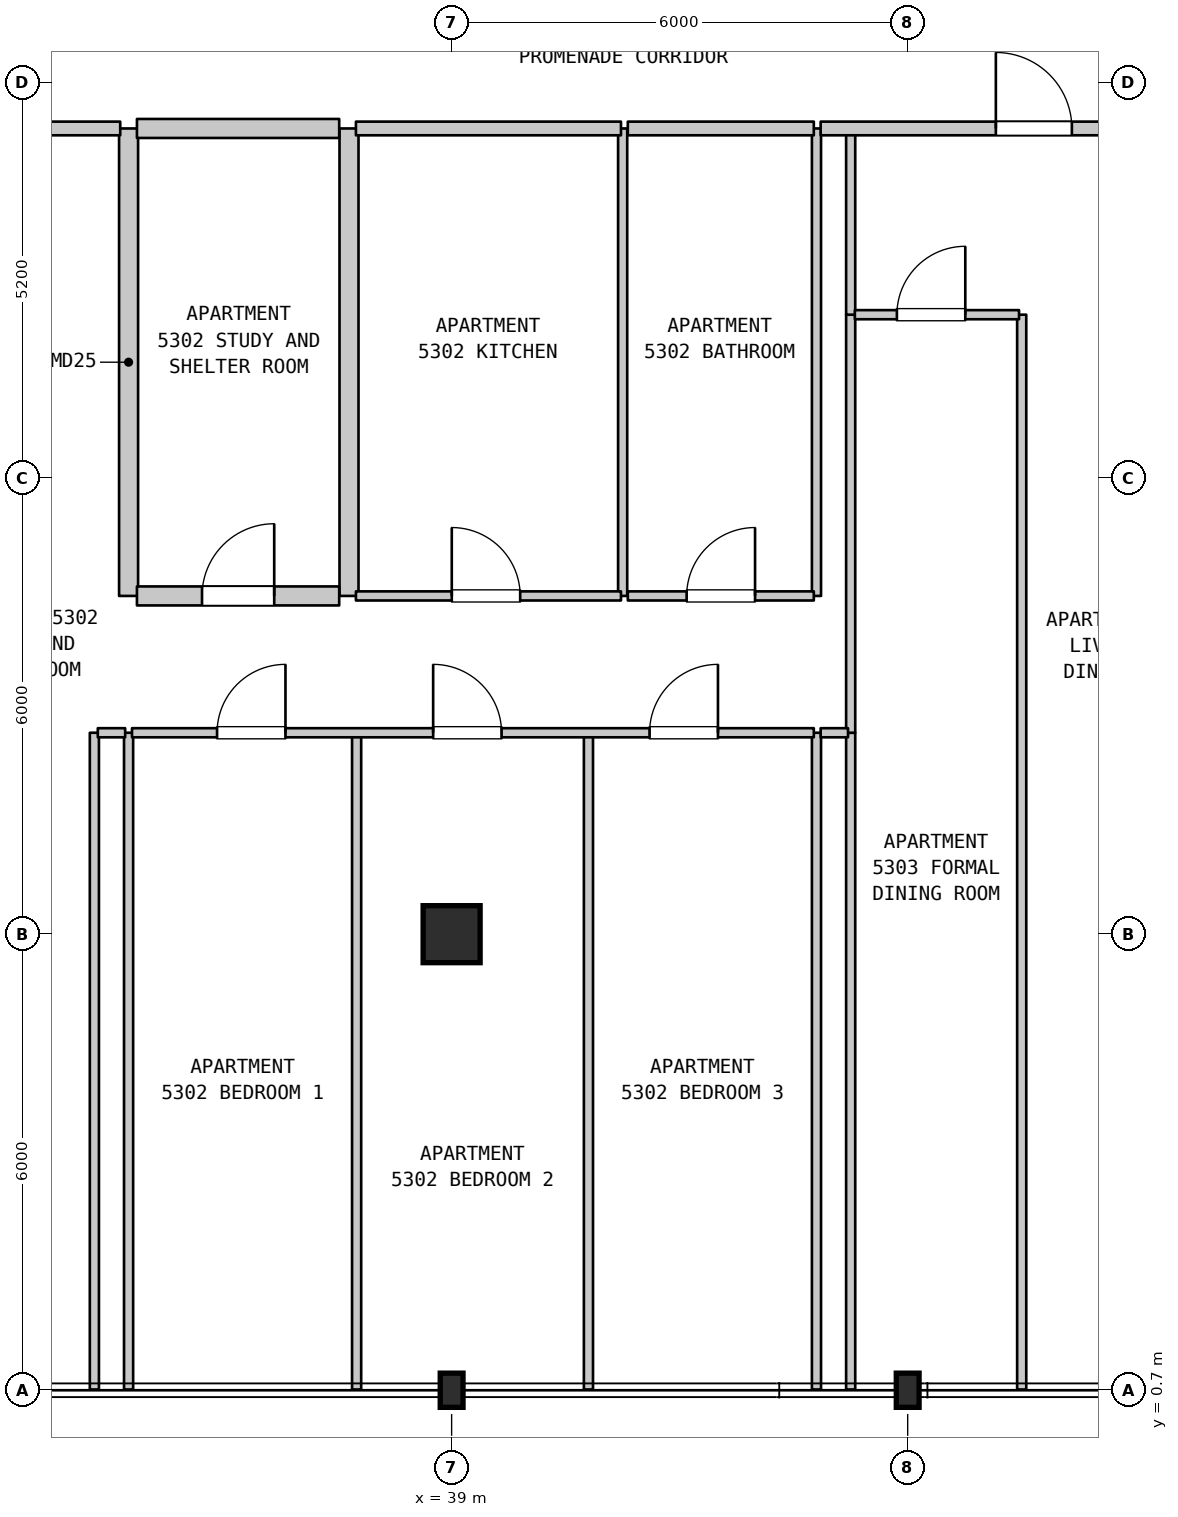
"""IFC4 building model, lengths in metres.
Left out: names, types, materials, properties, quantities, classifications, styles, units other than length and angle.
Written with IfcOpenShell. Run it as: python <this file> out.ifc"""

import sys

from ifc_helpers import new_model, si_unit, direction, frame, frame_2d, origin, origin_2d, place, context, subcontext, project, spatial, rectangle, i_section, extrude, element, fill, save


model = new_model("IFC4")
c1 = context("Model", 3, precision=1e-05, world=origin(), true_north=direction((0.0, 1.0)))
c2 = subcontext(c1, "Body", "Model", "MODEL_VIEW")
j1 = project(units=[si_unit("LENGTHUNIT", "METRE"), si_unit("PLANEANGLEUNIT", "RADIAN")], contexts=[c1])
p1 = place(None, origin())
s1 = spatial("IfcSite", under=j1, at=p1, CompositionType="ELEMENT")
p2 = place(p1, origin())
s2 = spatial("IfcBuilding", under=s1, at=p2, CompositionType="ELEMENT")
p3 = place(p2, frame((0.0, 0.0, 214.3)))
s3 = spatial("IfcBuildingStorey", under=s2, at=p3, CompositionType="ELEMENT", Elevation=214.3)
p4 = place(p3, frame((39.0, 0.7, 0.0), z_axis=(0.0, 0.0, 1.0), x_axis=(1.0, 0.0, 0.0)))
e1 = element("IfcColumn", 1, at=p4, inside=s3, PredefinedType="COLUMN", context=c2, shape_type="SweptSolid", body=[
    extrude(i_section(OverallWidth=0.3, OverallDepth=0.45, WebThickness=0.014, FlangeThickness=0.026, FilletRadius=0.027, at=origin_2d()), origin(), (0.0, 0.0, 1.0), 3.7),
])
p5 = place(p3, frame((39.0, 6.7, 0.0), z_axis=(0.0, 0.0, 1.0), x_axis=(1.0, 0.0, 0.0)))
e2 = element("IfcColumn", 2, at=p5, inside=s3, PredefinedType="COLUMN", context=c2, shape_type="SweptSolid", body=[
    extrude(rectangle(XDim=0.75, YDim=0.75, at=origin_2d()), origin(), (0.0, 0.0, 1.0), 3.7),
])
p6 = place(p3, frame((45.0, 0.7, 0.0), z_axis=(0.0, 0.0, 1.0), x_axis=(1.0, 0.0, 0.0)))
e3 = element("IfcColumn", 3, at=p6, inside=s3, PredefinedType="COLUMN", context=c2, shape_type="SweptSolid", body=[
    extrude(i_section(OverallWidth=0.3, OverallDepth=0.45, WebThickness=0.014, FlangeThickness=0.026, FilletRadius=0.027, at=origin_2d()), origin(), (0.0, 0.0, 1.0), 3.7),
])
for number, where, z_axis, x_axis in (
    (4, (34.3, 0.71, 0.0), (0.0, 0.0, 1.0), (0.0, 1.0, 0.0)),
    (5, (34.75, 0.71, 0.0), (0.0, 0.0, 1.0), (0.0, 1.0, 0.0)),
):
    element("IfcWall", number, at=place(p3, frame(where, z_axis=z_axis, x_axis=x_axis)), inside=s3, PredefinedType="PARTITIONING", context=c2, shape_type="SweptSolid", body=[
        extrude(rectangle(XDim=8.64, YDim=0.12, at=frame_2d((4.32, 0.0))), origin(), (0.0, 0.0, 1.0), 3.38),
    ])
for number, where, z_axis, x_axis in (
    (6, (34.75, 11.15, 0.0), (0.0, 0.0, 1.0), (0.0, 1.0, 0.0)),
    (7, (37.65, 11.15, 0.0), (0.0, 0.0, 1.0), (0.0, 1.0, 0.0)),
):
    element("IfcWall", number, at=place(p3, frame(where, z_axis=z_axis, x_axis=x_axis)), inside=s3, PredefinedType="STANDARD", context=c2, shape_type="SweptSolid", body=[
        extrude(rectangle(XDim=6.15, YDim=0.25, at=frame_2d((3.075, 0.0))), origin(), (0.0, 0.0, 1.0), 3.38),
    ])
for number, where, z_axis, x_axis in (
    (8, (37.75, 0.71, 0.0), (0.0, 0.0, 1.0), (0.0, 1.0, 0.0)),
    (9, (40.8, 0.71, 0.0), (0.0, 0.0, 1.0), (0.0, 1.0, 0.0)),
):
    element("IfcWall", number, at=place(p3, frame(where, z_axis=z_axis, x_axis=x_axis)), inside=s3, PredefinedType="PARTITIONING", context=c2, shape_type="SweptSolid", body=[
        extrude(rectangle(XDim=8.64, YDim=0.12, at=frame_2d((4.32, 0.0))), origin(), (0.0, 0.0, 1.0), 3.38),
    ])
p7 = place(p3, frame((41.25, 11.15, 0.0), z_axis=(0.0, 0.0, 1.0), x_axis=(0.0, 1.0, 0.0)))
e10 = element("IfcWall", 10, at=p7, inside=s3, PredefinedType="PARTITIONING", context=c2, shape_type="SweptSolid", body=[
    extrude(rectangle(XDim=6.15, YDim=0.12, at=frame_2d((3.075, 0.0))), origin(), (0.0, 0.0, 1.0), 3.38),
])
p8 = place(p3, frame((43.8, 0.71, 0.0), z_axis=(0.0, 0.0, 1.0), x_axis=(0.0, 1.0, 0.0)))
e11 = element("IfcWall", 11, at=p8, inside=s3, PredefinedType="PARTITIONING", context=c2, shape_type="SweptSolid", body=[
    extrude(rectangle(XDim=8.64, YDim=0.12, at=frame_2d((4.32, 0.0))), origin(), (0.0, 0.0, 1.0), 3.38),
])
p9 = place(p3, frame((43.8, 11.15, 0.0), z_axis=(0.0, 0.0, 1.0), x_axis=(0.0, 1.0, 0.0)))
e12 = element("IfcWall", 12, at=p9, inside=s3, PredefinedType="PARTITIONING", context=c2, shape_type="SweptSolid", body=[
    extrude(rectangle(XDim=6.15, YDim=0.12, at=frame_2d((3.075, 0.0))), origin(), (0.0, 0.0, 1.0), 3.38),
])
p10 = place(p3, frame((44.25, 0.71, 0.0), z_axis=(0.0, 0.0, 1.0), x_axis=(0.0, 1.0, 0.0)))
e13 = element("IfcWall", 13, at=p10, inside=s3, PredefinedType="PARTITIONING", context=c2, shape_type="SweptSolid", body=[
    extrude(rectangle(XDim=8.64, YDim=0.12, at=frame_2d((4.32, 0.0))), origin(), (0.0, 0.0, 1.0), 3.38),
])
p11 = place(p3, frame((44.25, 9.35, 0.0), z_axis=(0.0, 0.0, 1.0), x_axis=(0.0, 1.0, 0.0)))
e14 = element("IfcWall", 14, at=p11, inside=s3, PredefinedType="PARTITIONING", context=c2, shape_type="SweptSolid", body=[
    extrude(rectangle(XDim=5.5, YDim=0.12, at=frame_2d((2.75, 0.0))), origin(), (0.0, 0.0, 1.0), 3.38),
])
p12 = place(p3, frame((44.25, 14.85, 0.0), z_axis=(0.0, 0.0, 1.0), x_axis=(0.0, 1.0, 0.0)))
e15 = element("IfcWall", 15, at=p12, inside=s3, PredefinedType="PARTITIONING", context=c2, shape_type="SweptSolid", body=[
    extrude(rectangle(XDim=2.45, YDim=0.12, at=frame_2d((1.225, 0.0))), origin(), (0.0, 0.0, 1.0), 3.38),
])
p13 = place(p3, frame((46.5, 0.71, 0.0), z_axis=(0.0, 0.0, 1.0), x_axis=(0.0, 1.0, 0.0)))
e16 = element("IfcWall", 16, at=p13, inside=s3, PredefinedType="PARTITIONING", context=c2, shape_type="SweptSolid", body=[
    extrude(rectangle(XDim=14.14, YDim=0.12, at=frame_2d((7.07, 0.0))), origin(), (0.0, 0.0, 1.0), 3.38),
])
p14 = place(p3, frame((34.345, 9.35, 0.0), z_axis=(0.0, 0.0, 1.0), x_axis=(1.0, 0.0, 0.0)))
e17 = element("IfcWall", 17, at=p14, inside=s3, PredefinedType="PARTITIONING", context=c2, shape_type="SweptSolid", body=[
    extrude(rectangle(XDim=0.36, YDim=0.12, at=frame_2d((0.18, 0.0))), origin(), (0.0, 0.0, 1.0), 3.38),
])
p15 = place(p3, frame((34.795, 9.35, 0.0), z_axis=(0.0, 0.0, 1.0), x_axis=(1.0, 0.0, 0.0)))
e18 = element("IfcWall", 18, at=p15, inside=s3, PredefinedType="PARTITIONING", context=c2, shape_type="SweptSolid", body=[
    extrude(rectangle(XDim=8.97, YDim=0.12, at=frame_2d((4.485, 0.0))), origin(), (0.0, 0.0, 1.0), 3.38),
])
p16 = place(p15, frame((1.119, 0.0, 0.0)))
e19 = element("IfcOpeningElement", 19, at=p16, cuts=e18, PredefinedType="OPENING", context=c2, shape_type="SweptSolid", body=[
    extrude(rectangle(XDim=0.9, YDim=2.15, at=frame_2d((0.45, 1.075))), frame((0.0, 0.07, 0.0), z_axis=(0.0, -1.0, 0.0), x_axis=(1.0, 0.0, 0.0)), (0.0, 0.0, 1.0), 0.14),
])
p17 = place(p15, frame((3.962, 0.0, 0.0)))
e20 = element("IfcOpeningElement", 20, at=p17, cuts=e18, PredefinedType="OPENING", context=c2, shape_type="SweptSolid", body=[
    extrude(rectangle(XDim=0.9, YDim=2.15, at=frame_2d((0.45, 1.075))), frame((0.0, 0.07, 0.0), z_axis=(0.0, -1.0, 0.0), x_axis=(1.0, 0.0, 0.0)), (0.0, 0.0, 1.0), 0.14),
])
p18 = place(p15, frame((6.809, 0.0, 0.0)))
e21 = element("IfcOpeningElement", 21, at=p18, cuts=e18, PredefinedType="OPENING", context=c2, shape_type="SweptSolid", body=[
    extrude(rectangle(XDim=0.9, YDim=2.15, at=frame_2d((0.45, 1.075))), frame((0.0, 0.07, 0.0), z_axis=(0.0, -1.0, 0.0), x_axis=(1.0, 0.0, 0.0)), (0.0, 0.0, 1.0), 0.14),
])
p19 = place(p3, frame((43.855, 9.35, 0.0), z_axis=(0.0, 0.0, 1.0), x_axis=(1.0, 0.0, 0.0)))
e22 = element("IfcWall", 22, at=p19, inside=s3, PredefinedType="PARTITIONING", context=c2, shape_type="SweptSolid", body=[
    extrude(rectangle(XDim=0.36, YDim=0.12, at=frame_2d((0.18, 0.0))), origin(), (0.0, 0.0, 1.0), 3.38),
])
p20 = place(p3, frame((34.86, 11.15, 0.0), z_axis=(0.0, 0.0, 1.0), x_axis=(1.0, 0.0, 0.0)))
e23 = element("IfcWall", 23, at=p20, inside=s3, PredefinedType="STANDARD", context=c2, shape_type="SweptSolid", body=[
    extrude(rectangle(XDim=2.661, YDim=0.25, at=frame_2d((1.331, 0.0))), origin(), (0.0, 0.0, 1.0), 3.38),
])
p21 = place(p20, frame((0.856, 0.0, 0.0)))
e24 = element("IfcOpeningElement", 24, at=p21, cuts=e23, PredefinedType="OPENING", context=c2, shape_type="SweptSolid", body=[
    extrude(rectangle(XDim=0.95, YDim=2.15, at=frame_2d((0.475, 1.075))), frame((0.0, 0.135, 0.0), z_axis=(0.0, -1.0, 0.0), x_axis=(1.0, 0.0, 0.0)), (0.0, 0.0, 1.0), 0.27),
])
p22 = place(p3, frame((37.741, 11.15, 0.0), z_axis=(0.0, 0.0, 1.0), x_axis=(1.0, 0.0, 0.0)))
e25 = element("IfcWall", 25, at=p22, inside=s3, PredefinedType="PARTITIONING", context=c2, shape_type="SweptSolid", body=[
    extrude(rectangle(XDim=3.487, YDim=0.12, at=frame_2d((1.744, 0.0))), origin(), (0.0, 0.0, 1.0), 3.38),
])
p23 = place(p22, frame((1.261, 0.0, 0.0)))
e26 = element("IfcOpeningElement", 26, at=p23, cuts=e25, PredefinedType="OPENING", context=c2, shape_type="SweptSolid", body=[
    extrude(rectangle(XDim=0.9, YDim=2.15, at=frame_2d((0.45, 1.075))), frame((0.0, 0.07, 0.0), z_axis=(0.0, -1.0, 0.0), x_axis=(1.0, 0.0, 0.0)), (0.0, 0.0, 1.0), 0.14),
])
p24 = place(p3, frame((41.318, 11.15, 0.0), z_axis=(0.0, 0.0, 1.0), x_axis=(1.0, 0.0, 0.0)))
e27 = element("IfcWall", 27, at=p24, inside=s3, PredefinedType="PARTITIONING", context=c2, shape_type="SweptSolid", body=[
    extrude(rectangle(XDim=2.447, YDim=0.12, at=frame_2d((1.223, 0.0))), origin(), (0.0, 0.0, 1.0), 3.38),
])
p25 = place(p24, frame((0.774, 0.0, 0.0)))
e28 = element("IfcOpeningElement", 28, at=p25, cuts=e27, PredefinedType="OPENING", context=c2, shape_type="SweptSolid", body=[
    extrude(rectangle(XDim=0.9, YDim=2.1, at=frame_2d((0.45, 1.05))), frame((0.0, 0.07, 0.0), z_axis=(0.0, -1.0, 0.0), x_axis=(1.0, 0.0, 0.0)), (0.0, 0.0, 1.0), 0.14),
])
p26 = place(p3, frame((44.305, 14.85, 0.0), z_axis=(0.0, 0.0, 1.0), x_axis=(1.0, 0.0, 0.0)))
e29 = element("IfcWall", 29, at=p26, inside=s3, PredefinedType="PARTITIONING", context=c2, shape_type="SweptSolid", body=[
    extrude(rectangle(XDim=2.16, YDim=0.12, at=frame_2d((1.08, 0.0))), origin(), (0.0, 0.0, 1.0), 3.38),
])
p27 = place(p26, frame((0.553, 0.0, 0.0)))
e30 = element("IfcOpeningElement", 30, at=p27, cuts=e29, PredefinedType="OPENING", context=c2, shape_type="SweptSolid", body=[
    extrude(rectangle(XDim=0.9, YDim=2.15, at=frame_2d((0.45, 1.075))), frame((0.0, 0.07, 0.0), z_axis=(0.0, -1.0, 0.0), x_axis=(1.0, 0.0, 0.0)), (0.0, 0.0, 1.0), 0.14),
])
p28 = place(p3, frame((29.545, 17.3, 0.0), z_axis=(0.0, 0.0, 1.0), x_axis=(1.0, 0.0, 0.0)))
e31 = element("IfcWall", 31, at=p28, inside=s3, PredefinedType="STANDARD", context=c2, shape_type="SweptSolid", body=[
    extrude(rectangle(XDim=5.095, YDim=0.18, at=frame_2d((2.547, 0.0))), origin(), (0.0, 0.0, 1.0), 3.38),
])
p29 = place(p28, frame((1.792, 0.0, 0.0)))
e32 = element("IfcOpeningElement", 32, at=p29, cuts=e31, PredefinedType="OPENING", context=c2, shape_type="SweptSolid", body=[
    extrude(rectangle(XDim=1.0, YDim=2.15, at=frame_2d((0.5, 1.075))), frame((0.0, 0.1, 0.0), z_axis=(0.0, -1.0, 0.0), x_axis=(1.0, 0.0, 0.0)), (0.0, 0.0, 1.0), 0.2),
])
p30 = place(p3, frame((34.86, 17.3, 0.0), z_axis=(0.0, 0.0, 1.0), x_axis=(1.0, 0.0, 0.0)))
e33 = element("IfcWall", 33, at=p30, inside=s3, PredefinedType="STANDARD", context=c2, shape_type="SweptSolid", body=[
    extrude(rectangle(XDim=2.661, YDim=0.25, at=frame_2d((1.331, 0.0))), origin(), (0.0, 0.0, 1.0), 3.38),
])
p31 = place(p3, frame((37.741, 17.3, 0.0), z_axis=(0.0, 0.0, 1.0), x_axis=(1.0, 0.0, 0.0)))
e34 = element("IfcWall", 34, at=p31, inside=s3, PredefinedType="STANDARD", context=c2, shape_type="SweptSolid", body=[
    extrude(rectangle(XDim=3.487, YDim=0.18, at=frame_2d((1.744, 0.0))), origin(), (0.0, 0.0, 1.0), 3.38),
])
p32 = place(p3, frame((41.318, 17.3, 0.0), z_axis=(0.0, 0.0, 1.0), x_axis=(1.0, 0.0, 0.0)))
e35 = element("IfcWall", 35, at=p32, inside=s3, PredefinedType="STANDARD", context=c2, shape_type="SweptSolid", body=[
    extrude(rectangle(XDim=2.447, YDim=0.18, at=frame_2d((1.223, 0.0))), origin(), (0.0, 0.0, 1.0), 3.38),
])
p33 = place(p3, frame((43.855, 17.3, 0.0), z_axis=(0.0, 0.0, 1.0), x_axis=(1.0, 0.0, 0.0)))
e36 = element("IfcWall", 36, at=p33, inside=s3, PredefinedType="STANDARD", context=c2, shape_type="SweptSolid", body=[
    extrude(rectangle(XDim=5.21, YDim=0.18, at=frame_2d((2.605, 0.0))), origin(), (0.0, 0.0, 1.0), 3.38),
])
p34 = place(p33, frame((2.305, 0.0, 0.0)))
e37 = element("IfcOpeningElement", 37, at=p34, cuts=e36, PredefinedType="OPENING", context=c2, shape_type="SweptSolid", body=[
    extrude(rectangle(XDim=1.0, YDim=2.15, at=frame_2d((0.5, 1.075))), frame((0.0, 0.1, 0.0), z_axis=(0.0, -1.0, 0.0), x_axis=(1.0, 0.0, 0.0)), (0.0, 0.0, 1.0), 0.2),
])
p35 = place(p16, origin())
e38 = element("IfcDoor", 38, at=p35, inside=s3, OperationType="SINGLE_SWING_RIGHT", PredefinedType="DOOR", context=c2, shape_type="SweptSolid", body=[
    extrude(rectangle(XDim=0.9, YDim=2.15, at=frame_2d((0.45, 1.075))), frame((0.0, 0.025, 0.0), z_axis=(0.0, -1.0, 0.0), x_axis=(1.0, 0.0, 0.0)), (0.0, 0.0, 1.0), 0.05),
])
fill(e19, e38)
p36 = place(p17, origin())
e39 = element("IfcDoor", 39, at=p36, inside=s3, OperationType="SINGLE_SWING_LEFT", PredefinedType="DOOR", context=c2, shape_type="SweptSolid", body=[
    extrude(rectangle(XDim=0.9, YDim=2.15, at=frame_2d((0.45, 1.075))), frame((0.0, 0.025, 0.0), z_axis=(0.0, -1.0, 0.0), x_axis=(1.0, 0.0, 0.0)), (0.0, 0.0, 1.0), 0.05),
])
fill(e20, e39)
p37 = place(p18, origin())
e40 = element("IfcDoor", 40, at=p37, inside=s3, OperationType="SINGLE_SWING_RIGHT", PredefinedType="DOOR", context=c2, shape_type="SweptSolid", body=[
    extrude(rectangle(XDim=0.9, YDim=2.15, at=frame_2d((0.45, 1.075))), frame((0.0, 0.025, 0.0), z_axis=(0.0, -1.0, 0.0), x_axis=(1.0, 0.0, 0.0)), (0.0, 0.0, 1.0), 0.05),
])
fill(e21, e40)
p38 = place(p21, origin())
e41 = element("IfcDoor", 41, at=p38, inside=s3, OperationType="SINGLE_SWING_RIGHT", PredefinedType="DOOR", context=c2, shape_type="SweptSolid", body=[
    extrude(rectangle(XDim=0.95, YDim=2.15, at=frame_2d((0.475, 1.075))), frame((0.0, 0.025, 0.0), z_axis=(0.0, -1.0, 0.0), x_axis=(1.0, 0.0, 0.0)), (0.0, 0.0, 1.0), 0.05),
])
fill(e24, e41)
p39 = place(p23, origin())
e42 = element("IfcDoor", 42, at=p39, inside=s3, OperationType="SINGLE_SWING_LEFT", PredefinedType="DOOR", context=c2, shape_type="SweptSolid", body=[
    extrude(rectangle(XDim=0.9, YDim=2.15, at=frame_2d((0.45, 1.075))), frame((0.0, 0.025, 0.0), z_axis=(0.0, -1.0, 0.0), x_axis=(1.0, 0.0, 0.0)), (0.0, 0.0, 1.0), 0.05),
])
fill(e26, e42)
p40 = place(p25, origin())
e43 = element("IfcDoor", 43, at=p40, inside=s3, OperationType="SINGLE_SWING_RIGHT", PredefinedType="DOOR", context=c2, shape_type="SweptSolid", body=[
    extrude(rectangle(XDim=0.9, YDim=2.1, at=frame_2d((0.45, 1.05))), frame((0.0, 0.025, 0.0), z_axis=(0.0, -1.0, 0.0), x_axis=(1.0, 0.0, 0.0)), (0.0, 0.0, 1.0), 0.05),
])
fill(e28, e43)
p41 = place(p27, origin())
e44 = element("IfcDoor", 44, at=p41, inside=s3, OperationType="SINGLE_SWING_RIGHT", PredefinedType="DOOR", context=c2, shape_type="SweptSolid", body=[
    extrude(rectangle(XDim=0.9, YDim=2.15, at=frame_2d((0.45, 1.075))), frame((0.0, 0.025, 0.0), z_axis=(0.0, -1.0, 0.0), x_axis=(1.0, 0.0, 0.0)), (0.0, 0.0, 1.0), 0.05),
])
fill(e30, e44)
p42 = place(p34, origin())
e45 = element("IfcDoor", 45, at=p42, inside=s3, OperationType="SINGLE_SWING_LEFT", PredefinedType="DOOR", context=c2, shape_type="SweptSolid", body=[
    extrude(rectangle(XDim=1.0, YDim=2.15, at=frame_2d((0.5, 1.075))), frame((0.0, 0.025, 0.0), z_axis=(0.0, -1.0, 0.0), x_axis=(1.0, 0.0, 0.0)), (0.0, 0.0, 1.0), 0.05),
])
fill(e37, e45)
save(model, sys.argv[1])
